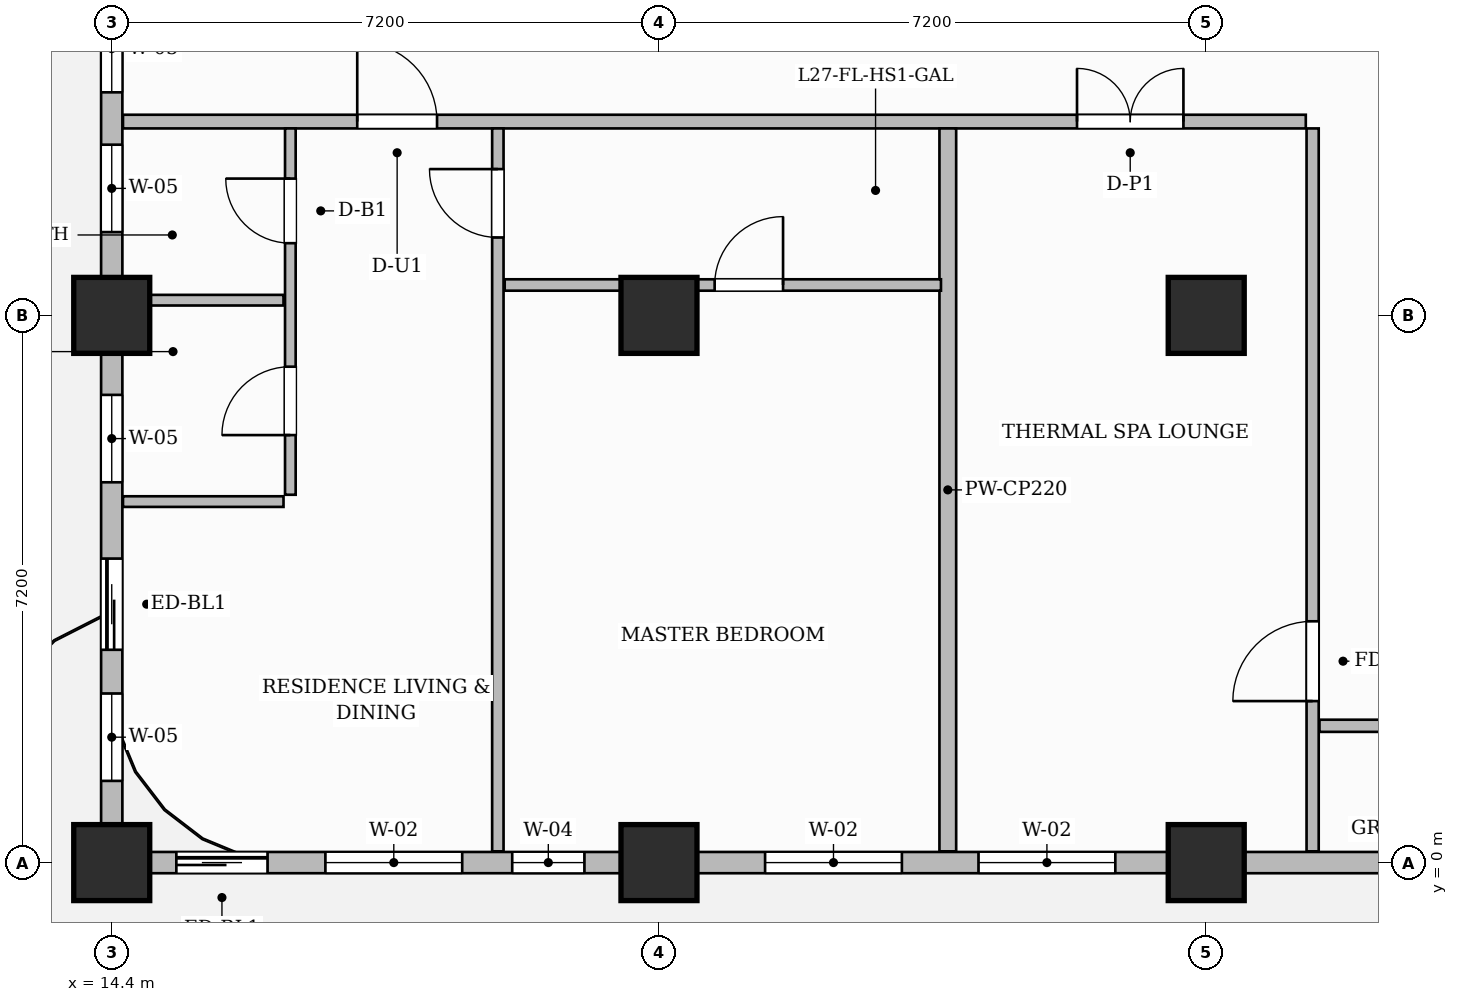
"""IFC4 building model, lengths in metres.
Left out: names, types, materials, properties, quantities, classifications, styles, units other than length and angle.
Written with IfcOpenShell. Run it as: python <this file> out.ifc"""

import sys

from ifc_helpers import new_model, si_unit, direction, frame, frame_2d, origin, origin_2d, place, context, subcontext, project, spatial, rectangle, extrude, source, transform, mapped, element, fill, save


model = new_model("IFC4")
c1 = context("Model", 3, precision=1e-05, world=origin(), true_north=direction((0.0, 1.0)))
c2 = subcontext(c1, "Body", "Model", "MODEL_VIEW")
j1 = project(units=[si_unit("LENGTHUNIT", "METRE"), si_unit("PLANEANGLEUNIT", "RADIAN")], contexts=[c1])
p1 = place(None, origin())
s1 = spatial("IfcSite", under=j1, at=p1, CompositionType="ELEMENT")
p2 = place(p1, origin())
s2 = spatial("IfcBuilding", under=s1, at=p2, CompositionType="ELEMENT")
p3 = place(p2, frame((0.0, 0.0, 111.8)))
s3 = spatial("IfcBuildingStorey", under=s2, at=p3, CompositionType="ELEMENT", Elevation=111.8)
m1 = source(origin(), c2, "Body", "SweptSolid", [
    extrude(rectangle(XDim=1.0, YDim=1.0, at=origin_2d()), origin(), (0.0, 0.0, 1.0), 3.7),
])
for number, where, z_axis, x_axis in (
    (1, (14.4, 0.0, 0.0), (0.0, 0.0, 1.0), (1.0, 0.0, 0.0)),
    (2, (14.4, 7.2, 0.0), (0.0, 0.0, 1.0), (1.0, 0.0, 0.0)),
    (3, (21.6, 0.0, 0.0), (0.0, 0.0, 1.0), (1.0, 0.0, 0.0)),
    (4, (21.6, 7.2, 0.0), (0.0, 0.0, 1.0), (1.0, 0.0, 0.0)),
    (5, (28.8, 0.0, 0.0), (0.0, 0.0, 1.0), (1.0, 0.0, 0.0)),
    (6, (28.8, 7.2, 0.0), (0.0, 0.0, 1.0), (1.0, 0.0, 0.0)),
):
    element("IfcColumn", number, at=place(p3, frame(where, z_axis=z_axis, x_axis=x_axis)), inside=s3, PredefinedType="COLUMN", context=c2, shape_type="MappedRepresentation", body=[
        mapped(m1, transform((0.0, 0.0, 0.0), scale=1.0)),
    ])
p4 = place(p3, frame((14.548, 9.75, 0.0), z_axis=(0.0, 0.0, 1.0), x_axis=(1.0, 0.0, 0.0)))
e7 = element("IfcWall", 7, at=p4, inside=s3, PredefinedType="PARTITIONING", context=c2, shape_type="SweptSolid", body=[
    extrude(rectangle(XDim=15.562, YDim=0.18, at=frame_2d((7.781, 0.0))), origin(), (0.0, 0.0, 1.0), 3.45),
])
p5 = place(p4, frame((3.082, 0.0, 0.0)))
e8 = element("IfcOpeningElement", 8, at=p5, cuts=e7, PredefinedType="OPENING", context=c2, shape_type="SweptSolid", body=[
    extrude(rectangle(XDim=1.05, YDim=2.25, at=frame_2d((0.525, 1.125))), frame((0.0, 0.1, 0.0), z_axis=(0.0, -1.0, 0.0), x_axis=(1.0, 0.0, 0.0)), (0.0, 0.0, 1.0), 0.2),
])
p6 = place(p4, frame((12.552, 0.0, 0.0)))
e9 = element("IfcOpeningElement", 9, at=p6, cuts=e7, PredefinedType="OPENING", context=c2, shape_type="SweptSolid", body=[
    extrude(rectangle(XDim=1.4, YDim=2.35, at=frame_2d((0.7, 1.175))), frame((0.0, 0.1, 0.0), z_axis=(0.0, -1.0, 0.0), x_axis=(1.0, 0.0, 0.0)), (0.0, 0.0, 1.0), 0.2),
])
p7 = place(p3, frame((30.2, 0.148, 0.0), z_axis=(0.0, 0.0, 1.0), x_axis=(0.0, 1.0, 0.0)))
e10 = element("IfcWall", 10, at=p7, inside=s3, PredefinedType="PARTITIONING", context=c2, shape_type="SweptSolid", body=[
    extrude(rectangle(XDim=9.512, YDim=0.16, at=frame_2d((4.756, 0.0))), origin(), (0.0, 0.0, 1.0), 3.45),
])
p8 = place(p7, frame((1.977, 0.0, 0.0)))
e11 = element("IfcOpeningElement", 11, at=p8, cuts=e10, PredefinedType="OPENING", context=c2, shape_type="SweptSolid", body=[
    extrude(rectangle(XDim=1.05, YDim=2.15, at=frame_2d((0.525, 1.075))), frame((0.0, 0.09, 0.0), z_axis=(0.0, -1.0, 0.0), x_axis=(1.0, 0.0, 0.0)), (0.0, 0.0, 1.0), 0.18),
])
p9 = place(p3, frame((30.29, 1.8, 0.0), z_axis=(0.0, 0.0, 1.0), x_axis=(1.0, 0.0, 0.0)))
e12 = element("IfcWall", 12, at=p9, inside=s3, PredefinedType="PARTITIONING", context=c2, shape_type="SweptSolid", body=[
    extrude(rectangle(XDim=19.37, YDim=0.16, at=frame_2d((9.685, 0.0))), origin(), (0.0, 0.0, 1.0), 3.45),
])
p10 = place(p9, frame((2.916, 0.0, 0.0)))
e13 = element("IfcOpeningElement", 13, at=p10, cuts=e12, PredefinedType="OPENING", context=c2, shape_type="SweptSolid", body=[
    extrude(rectangle(XDim=0.9, YDim=2.15, at=frame_2d((0.45, 1.075))), frame((0.0, 0.09, 0.0), z_axis=(0.0, -1.0, 0.0), x_axis=(1.0, 0.0, 0.0)), (0.0, 0.0, 1.0), 0.18),
])
p11 = place(p9, frame((9.66, 0.0, 0.0)))
e14 = element("IfcOpeningElement", 14, at=p11, cuts=e12, PredefinedType="OPENING", context=c2, shape_type="SweptSolid", body=[
    extrude(rectangle(XDim=0.9, YDim=2.15, at=frame_2d((0.45, 1.075))), frame((0.0, 0.09, 0.0), z_axis=(0.0, -1.0, 0.0), x_axis=(1.0, 0.0, 0.0)), (0.0, 0.0, 1.0), 0.18),
])
p12 = place(p9, frame((15.86, 0.0, 0.0)))
e15 = element("IfcOpeningElement", 15, at=p12, cuts=e12, PredefinedType="OPENING", context=c2, shape_type="SweptSolid", body=[
    extrude(rectangle(XDim=0.9, YDim=2.15, at=frame_2d((0.45, 1.075))), frame((0.0, 0.09, 0.0), z_axis=(0.0, -1.0, 0.0), x_axis=(1.0, 0.0, 0.0)), (0.0, 0.0, 1.0), 0.18),
])
p13 = place(p3, frame((25.4, 0.148, 0.0), z_axis=(0.0, 0.0, 1.0), x_axis=(0.0, 1.0, 0.0)))
e16 = element("IfcWall", 16, at=p13, inside=s3, PredefinedType="PARTITIONING", context=c2, shape_type="SweptSolid", body=[
    extrude(rectangle(XDim=9.512, YDim=0.22, at=frame_2d((4.756, 0.0))), origin(), (0.0, 0.0, 1.0), 3.105),
])
p14 = place(p3, frame((16.75, 4.84, 0.0), z_axis=(0.0, 0.0, 1.0), x_axis=(0.0, 1.0, 0.0)))
e17 = element("IfcWall", 17, at=p14, inside=s3, PredefinedType="PARTITIONING", context=c2, shape_type="SweptSolid", body=[
    extrude(rectangle(XDim=4.82, YDim=0.14, at=frame_2d((2.41, 0.0))), origin(), (0.0, 0.0, 1.0), 3.45),
])
p15 = place(p14, frame((0.785, 0.0, 0.0)))
e18 = element("IfcOpeningElement", 18, at=p15, cuts=e17, PredefinedType="OPENING", context=c2, shape_type="SweptSolid", body=[
    extrude(rectangle(XDim=0.9, YDim=2.15, at=frame_2d((0.45, 1.075))), frame((0.0, 0.08, 0.0), z_axis=(0.0, -1.0, 0.0), x_axis=(1.0, 0.0, 0.0)), (0.0, 0.0, 1.0), 0.16),
])
p16 = place(p14, frame((3.31, 0.0, 0.0)))
e19 = element("IfcOpeningElement", 19, at=p16, cuts=e17, PredefinedType="OPENING", context=c2, shape_type="SweptSolid", body=[
    extrude(rectangle(XDim=0.85, YDim=2.1, at=frame_2d((0.425, 1.05))), frame((0.0, 0.08, 0.0), z_axis=(0.0, -1.0, 0.0), x_axis=(1.0, 0.0, 0.0)), (0.0, 0.0, 1.0), 0.16),
])
p17 = place(p3, frame((14.59, 7.4, 0.0), z_axis=(0.0, 0.0, 1.0), x_axis=(1.0, 0.0, 0.0)))
e20 = element("IfcWall", 20, at=p17, inside=s3, PredefinedType="PARTITIONING", context=c2, shape_type="SweptSolid", body=[
    extrude(rectangle(XDim=2.07, YDim=0.14, at=frame_2d((1.035, 0.0))), origin(), (0.0, 0.0, 1.0), 2.935),
])
p18 = place(p3, frame((14.548, 4.75, 0.0), z_axis=(0.0, 0.0, 1.0), x_axis=(1.0, 0.0, 0.0)))
e21 = element("IfcWall", 21, at=p18, inside=s3, PredefinedType="PARTITIONING", context=c2, shape_type="SweptSolid", body=[
    extrude(rectangle(XDim=2.112, YDim=0.14, at=frame_2d((1.056, 0.0))), origin(), (0.0, 0.0, 1.0), 3.45),
])
p19 = place(p3, frame((19.48, 0.148, 0.0), z_axis=(0.0, 0.0, 1.0), x_axis=(0.0, 1.0, 0.0)))
e22 = element("IfcWall", 22, at=p19, inside=s3, PredefinedType="PARTITIONING", context=c2, shape_type="SweptSolid", body=[
    extrude(rectangle(XDim=9.512, YDim=0.15, at=frame_2d((4.756, 0.0))), origin(), (0.0, 0.0, 1.0), 3.45),
])
p20 = place(p19, frame((8.077, 0.0, 0.0)))
e23 = element("IfcOpeningElement", 23, at=p20, cuts=e22, PredefinedType="OPENING", context=c2, shape_type="SweptSolid", body=[
    extrude(rectangle(XDim=0.9, YDim=2.15, at=frame_2d((0.45, 1.075))), frame((0.0, 0.085, 0.0), z_axis=(0.0, -1.0, 0.0), x_axis=(1.0, 0.0, 0.0)), (0.0, 0.0, 1.0), 0.17),
])
p21 = place(p3, frame((19.57, 7.6, 0.0), z_axis=(0.0, 0.0, 1.0), x_axis=(1.0, 0.0, 0.0)))
e24 = element("IfcWall", 24, at=p21, inside=s3, PredefinedType="PARTITIONING", context=c2, shape_type="SweptSolid", body=[
    extrude(rectangle(XDim=5.74, YDim=0.15, at=frame_2d((2.87, 0.0))), origin(), (0.0, 0.0, 1.0), 3.45),
])
p22 = place(p21, frame((2.762, 0.0, 0.0)))
e25 = element("IfcOpeningElement", 25, at=p22, cuts=e24, PredefinedType="OPENING", context=c2, shape_type="SweptSolid", body=[
    extrude(rectangle(XDim=0.9, YDim=2.15, at=frame_2d((0.45, 1.075))), frame((0.0, 0.085, 0.0), z_axis=(0.0, -1.0, 0.0), x_axis=(1.0, 0.0, 0.0)), (0.0, 0.0, 1.0), 0.17),
])
p23 = place(p3, frame((14.4, 0.0, 0.0), z_axis=(0.0, 0.0, 1.0), x_axis=(1.0, 0.0, 0.0)))
e26 = element("IfcWall", 26, at=p23, inside=s3, PredefinedType="SOLIDWALL", context=c2, shape_type="SweptSolid", body=[
    extrude(rectangle(XDim=35.4, YDim=0.28, at=frame_2d((17.7, 0.0))), origin(), (0.0, 0.0, 1.0), 2.935),
])
p24 = place(p23, frame((0.85, 0.0, 0.0)))
e27 = element("IfcOpeningElement", 27, at=p24, cuts=e26, PredefinedType="OPENING", context=c2, shape_type="SweptSolid", body=[
    extrude(rectangle(XDim=1.2, YDim=2.2, at=frame_2d((0.6, 1.1))), frame((0.0, 0.15, 0.0), z_axis=(0.0, -1.0, 0.0), x_axis=(1.0, 0.0, 0.0)), (0.0, 0.0, 1.0), 0.3),
])
p25 = place(p23, frame((2.811, 0.0, 0.8)))
e28 = element("IfcOpeningElement", 28, at=p25, cuts=e26, PredefinedType="OPENING", context=c2, shape_type="SweptSolid", body=[
    extrude(rectangle(XDim=1.8, YDim=1.85, at=frame_2d((0.9, 0.925))), frame((0.0, 0.15, 0.0), z_axis=(0.0, -1.0, 0.0), x_axis=(1.0, 0.0, 0.0)), (0.0, 0.0, 1.0), 0.3),
])
p26 = place(p23, frame((5.269, 0.0, 0.8)))
e29 = element("IfcOpeningElement", 29, at=p26, cuts=e26, PredefinedType="OPENING", context=c2, shape_type="SweptSolid", body=[
    extrude(rectangle(XDim=0.95, YDim=1.75, at=frame_2d((0.475, 0.875))), frame((0.0, 0.15, 0.0), z_axis=(0.0, -1.0, 0.0), x_axis=(1.0, 0.0, 0.0)), (0.0, 0.0, 1.0), 0.3),
])
p27 = place(p23, frame((8.596, 0.0, 0.8)))
e30 = element("IfcOpeningElement", 30, at=p27, cuts=e26, PredefinedType="OPENING", context=c2, shape_type="SweptSolid", body=[
    extrude(rectangle(XDim=1.8, YDim=1.85, at=frame_2d((0.9, 0.925))), frame((0.0, 0.15, 0.0), z_axis=(0.0, -1.0, 0.0), x_axis=(1.0, 0.0, 0.0)), (0.0, 0.0, 1.0), 0.3),
])
p28 = place(p23, frame((11.404, 0.0, 0.8)))
e31 = element("IfcOpeningElement", 31, at=p28, cuts=e26, PredefinedType="OPENING", context=c2, shape_type="SweptSolid", body=[
    extrude(rectangle(XDim=1.8, YDim=1.85, at=frame_2d((0.9, 0.925))), frame((0.0, 0.15, 0.0), z_axis=(0.0, -1.0, 0.0), x_axis=(1.0, 0.0, 0.0)), (0.0, 0.0, 1.0), 0.3),
])
p29 = place(p23, frame((16.804, 0.0, 0.8)))
e32 = element("IfcOpeningElement", 32, at=p29, cuts=e26, PredefinedType="OPENING", context=c2, shape_type="SweptSolid", body=[
    extrude(rectangle(XDim=1.8, YDim=1.85, at=frame_2d((0.9, 0.925))), frame((0.0, 0.15, 0.0), z_axis=(0.0, -1.0, 0.0), x_axis=(1.0, 0.0, 0.0)), (0.0, 0.0, 1.0), 0.3),
])
p30 = place(p23, frame((21.521, 0.0, 0.8)))
e33 = element("IfcOpeningElement", 33, at=p30, cuts=e26, PredefinedType="OPENING", context=c2, shape_type="SweptSolid", body=[
    extrude(rectangle(XDim=0.95, YDim=1.75, at=frame_2d((0.475, 0.875))), frame((0.0, 0.15, 0.0), z_axis=(0.0, -1.0, 0.0), x_axis=(1.0, 0.0, 0.0)), (0.0, 0.0, 1.0), 0.3),
])
p31 = place(p23, frame((23.904, 0.0, 0.8)))
e34 = element("IfcOpeningElement", 34, at=p31, cuts=e26, PredefinedType="OPENING", context=c2, shape_type="SweptSolid", body=[
    extrude(rectangle(XDim=1.8, YDim=1.85, at=frame_2d((0.9, 0.925))), frame((0.0, 0.15, 0.0), z_axis=(0.0, -1.0, 0.0), x_axis=(1.0, 0.0, 0.0)), (0.0, 0.0, 1.0), 0.3),
])
p32 = place(p23, frame((29.681, 0.0, 0.8)))
e35 = element("IfcOpeningElement", 35, at=p32, cuts=e26, PredefinedType="OPENING", context=c2, shape_type="SweptSolid", body=[
    extrude(rectangle(XDim=1.8, YDim=1.85, at=frame_2d((0.9, 0.925))), frame((0.0, 0.15, 0.0), z_axis=(0.0, -1.0, 0.0), x_axis=(1.0, 0.0, 0.0)), (0.0, 0.0, 1.0), 0.3),
])
p33 = place(p23, frame((32.327, 0.0, 0.8)))
e36 = element("IfcOpeningElement", 36, at=p33, cuts=e26, PredefinedType="OPENING", context=c2, shape_type="SweptSolid", body=[
    extrude(rectangle(XDim=1.8, YDim=1.85, at=frame_2d((0.9, 0.925))), frame((0.0, 0.15, 0.0), z_axis=(0.0, -1.0, 0.0), x_axis=(1.0, 0.0, 0.0)), (0.0, 0.0, 1.0), 0.3),
])
p34 = place(p3, frame((14.4, 0.05, 0.0), z_axis=(0.0, 0.0, 1.0), x_axis=(0.0, 1.0, 0.0)))
e37 = element("IfcWall", 37, at=p34, inside=s3, PredefinedType="SOLIDWALL", context=c2, shape_type="SweptSolid", body=[
    extrude(rectangle(XDim=20.6, YDim=0.28, at=frame_2d((10.3, 0.0))), origin(), (0.0, 0.0, 1.0), 2.935),
])
p35 = place(p34, frame((2.75, 0.0, 0.0)))
e38 = element("IfcOpeningElement", 38, at=p35, cuts=e37, PredefinedType="OPENING", context=c2, shape_type="SweptSolid", body=[
    extrude(rectangle(XDim=1.2, YDim=2.2, at=frame_2d((0.6, 1.1))), frame((0.0, 0.15, 0.0), z_axis=(0.0, -1.0, 0.0), x_axis=(1.0, 0.0, 0.0)), (0.0, 0.0, 1.0), 0.3),
])
p36 = place(p34, frame((1.025, 0.0, 0.8)))
e39 = element("IfcOpeningElement", 39, at=p36, cuts=e37, PredefinedType="OPENING", context=c2, shape_type="SweptSolid", body=[
    extrude(rectangle(XDim=1.15, YDim=1.8, at=frame_2d((0.575, 0.9))), frame((0.0, 0.15, 0.0), z_axis=(0.0, -1.0, 0.0), x_axis=(1.0, 0.0, 0.0)), (0.0, 0.0, 1.0), 0.3),
])
p37 = place(p34, frame((4.954, 0.0, 0.8)))
e40 = element("IfcOpeningElement", 40, at=p37, cuts=e37, PredefinedType="OPENING", context=c2, shape_type="SweptSolid", body=[
    extrude(rectangle(XDim=1.15, YDim=1.8, at=frame_2d((0.575, 0.9))), frame((0.0, 0.15, 0.0), z_axis=(0.0, -1.0, 0.0), x_axis=(1.0, 0.0, 0.0)), (0.0, 0.0, 1.0), 0.3),
])
p38 = place(p34, frame((8.246, 0.0, 0.8)))
e41 = element("IfcOpeningElement", 41, at=p38, cuts=e37, PredefinedType="OPENING", context=c2, shape_type="SweptSolid", body=[
    extrude(rectangle(XDim=1.15, YDim=1.8, at=frame_2d((0.575, 0.9))), frame((0.0, 0.15, 0.0), z_axis=(0.0, -1.0, 0.0), x_axis=(1.0, 0.0, 0.0)), (0.0, 0.0, 1.0), 0.3),
])
p39 = place(p34, frame((10.085, 0.0, 0.8)))
e42 = element("IfcOpeningElement", 42, at=p39, cuts=e37, PredefinedType="OPENING", context=c2, shape_type="SweptSolid", body=[
    extrude(rectangle(XDim=1.15, YDim=1.8, at=frame_2d((0.575, 0.9))), frame((0.0, 0.15, 0.0), z_axis=(0.0, -1.0, 0.0), x_axis=(1.0, 0.0, 0.0)), (0.0, 0.0, 1.0), 0.3),
])
p40 = place(p34, frame((12.014, 0.0, 0.8)))
e43 = element("IfcOpeningElement", 43, at=p40, cuts=e37, PredefinedType="OPENING", context=c2, shape_type="SweptSolid", body=[
    extrude(rectangle(XDim=1.15, YDim=1.8, at=frame_2d((0.575, 0.9))), frame((0.0, 0.15, 0.0), z_axis=(0.0, -1.0, 0.0), x_axis=(1.0, 0.0, 0.0)), (0.0, 0.0, 1.0), 0.3),
])
p41 = place(p34, frame((16.79, 0.0, 0.8)))
e44 = element("IfcOpeningElement", 44, at=p41, cuts=e37, PredefinedType="OPENING", context=c2, shape_type="SweptSolid", body=[
    extrude(rectangle(XDim=1.8, YDim=1.85, at=frame_2d((0.9, 0.925))), frame((0.0, 0.15, 0.0), z_axis=(0.0, -1.0, 0.0), x_axis=(1.0, 0.0, 0.0)), (0.0, 0.0, 1.0), 0.3),
])
m2 = source(origin(), c2, "Body", "SweptSolid", [
    extrude(rectangle(XDim=1.05, YDim=2.15, at=frame_2d((0.525, 1.075))), frame((0.0, 0.025, 0.0), z_axis=(0.0, -1.0, 0.0), x_axis=(1.0, 0.0, 0.0)), (0.0, 0.0, 1.0), 0.05),
])
p42 = place(p8, origin())
e45 = element("IfcDoor", 45, at=p42, inside=s3, OperationType="SINGLE_SWING_LEFT", PredefinedType="DOOR", context=c2, shape_type="MappedRepresentation", body=[
    mapped(m2, transform((0.0, 0.0, 0.0), scale=1.0)),
])
fill(e11, e45)
m3 = source(origin(), c2, "Body", "SweptSolid", [
    extrude(rectangle(XDim=0.9, YDim=2.15, at=frame_2d((0.45, 1.075))), frame((0.0, 0.025, 0.0), z_axis=(0.0, -1.0, 0.0), x_axis=(1.0, 0.0, 0.0)), (0.0, 0.0, 1.0), 0.05),
])
p43 = place(p15, origin())
e46 = element("IfcDoor", 46, at=p43, inside=s3, OperationType="SINGLE_SWING_LEFT", PredefinedType="DOOR", context=c2, shape_type="MappedRepresentation", body=[
    mapped(m3, transform((0.0, 0.0, 0.0), scale=1.0)),
])
fill(e18, e46)
m4 = source(origin(), c2, "Body", "SweptSolid", [
    extrude(rectangle(XDim=0.85, YDim=2.1, at=frame_2d((0.425, 1.05))), frame((0.0, 0.025, 0.0), z_axis=(0.0, -1.0, 0.0), x_axis=(1.0, 0.0, 0.0)), (0.0, 0.0, 1.0), 0.05),
])
p44 = place(p16, origin())
e47 = element("IfcDoor", 47, at=p44, inside=s3, OperationType="SINGLE_SWING_RIGHT", PredefinedType="DOOR", context=c2, shape_type="MappedRepresentation", body=[
    mapped(m4, transform((0.0, 0.0, 0.0), scale=1.0)),
])
fill(e19, e47)
m5 = source(origin(), c2, "Body", "SweptSolid", [
    extrude(rectangle(XDim=1.05, YDim=2.25, at=frame_2d((0.525, 1.125))), frame((0.0, 0.025, 0.0), z_axis=(0.0, -1.0, 0.0), x_axis=(1.0, 0.0, 0.0)), (0.0, 0.0, 1.0), 0.05),
])
p45 = place(p5, origin())
e48 = element("IfcDoor", 48, at=p45, inside=s3, OperationType="SINGLE_SWING_LEFT", PredefinedType="DOOR", context=c2, shape_type="MappedRepresentation", body=[
    mapped(m5, transform((0.0, 0.0, 0.0), scale=1.0)),
])
fill(e8, e48)
p46 = place(p20, origin())
e49 = element("IfcDoor", 49, at=p46, inside=s3, OperationType="SINGLE_SWING_RIGHT", PredefinedType="DOOR", context=c2, shape_type="MappedRepresentation", body=[
    mapped(m3, transform((0.0, 0.0, 0.0), scale=1.0)),
])
fill(e23, e49)
p47 = place(p22, origin())
e50 = element("IfcDoor", 50, at=p47, inside=s3, OperationType="SINGLE_SWING_RIGHT", PredefinedType="DOOR", context=c2, shape_type="MappedRepresentation", body=[
    mapped(m3, transform((0.0, 0.0, 0.0), scale=1.0)),
])
fill(e25, e50)
m6 = source(origin(), c2, "Body", "SweptSolid", [
    extrude(rectangle(XDim=1.4, YDim=2.35, at=frame_2d((0.7, 1.175))), frame((0.0, 0.025, 0.0), z_axis=(0.0, -1.0, 0.0), x_axis=(1.0, 0.0, 0.0)), (0.0, 0.0, 1.0), 0.05),
])
p48 = place(p6, origin())
e51 = element("IfcDoor", 51, at=p48, inside=s3, OperationType="DOUBLE_DOOR_SINGLE_SWING", PredefinedType="DOOR", context=c2, shape_type="MappedRepresentation", body=[
    mapped(m6, transform((0.0, 0.0, 0.0), scale=1.0)),
])
fill(e9, e51)
m7 = source(origin(), c2, "Body", "SweptSolid", [
    extrude(rectangle(XDim=1.2, YDim=2.2, at=frame_2d((0.6, 1.1))), frame((0.0, 0.025, 0.0), z_axis=(0.0, -1.0, 0.0), x_axis=(1.0, 0.0, 0.0)), (0.0, 0.0, 1.0), 0.05),
])
p49 = place(p24, origin())
e52 = element("IfcDoor", 52, at=p49, inside=s3, OperationType="SLIDING_TO_LEFT", PredefinedType="DOOR", context=c2, shape_type="MappedRepresentation", body=[
    mapped(m7, transform((0.0, 0.0, 0.0), scale=1.0)),
])
fill(e27, e52)
p50 = place(p35, origin())
e53 = element("IfcDoor", 53, at=p50, inside=s3, OperationType="SLIDING_TO_LEFT", PredefinedType="DOOR", context=c2, shape_type="MappedRepresentation", body=[
    mapped(m7, transform((0.0, 0.0, 0.0), scale=1.0)),
])
fill(e38, e53)
m8 = source(origin(), c2, "Body", "SweptSolid", [
    extrude(rectangle(XDim=1.8, YDim=1.85, at=frame_2d((0.9, 0.925))), frame((0.0, 0.03, 0.0), z_axis=(0.0, -1.0, 0.0), x_axis=(1.0, 0.0, 0.0)), (0.0, 0.0, 1.0), 0.06),
])
p51 = place(p25, origin())
e54 = element("IfcWindow", 54, at=p51, inside=s3, PartitioningType="DOUBLE_PANEL_VERTICAL", PredefinedType="WINDOW", context=c2, shape_type="MappedRepresentation", body=[
    mapped(m8, transform((0.0, 0.0, 0.0), scale=1.0)),
])
fill(e28, e54)
m9 = source(origin(), c2, "Body", "SweptSolid", [
    extrude(rectangle(XDim=0.95, YDim=1.75, at=frame_2d((0.475, 0.875))), frame((0.0, 0.03, 0.0), z_axis=(0.0, -1.0, 0.0), x_axis=(1.0, 0.0, 0.0)), (0.0, 0.0, 1.0), 0.06),
])
p52 = place(p26, origin())
e55 = element("IfcWindow", 55, at=p52, inside=s3, PartitioningType="SINGLE_PANEL", PredefinedType="WINDOW", context=c2, shape_type="MappedRepresentation", body=[
    mapped(m9, transform((0.0, 0.0, 0.0), scale=1.0)),
])
fill(e29, e55)
p53 = place(p27, origin())
e56 = element("IfcWindow", 56, at=p53, inside=s3, PartitioningType="DOUBLE_PANEL_VERTICAL", PredefinedType="WINDOW", context=c2, shape_type="MappedRepresentation", body=[
    mapped(m8, transform((0.0, 0.0, 0.0), scale=1.0)),
])
fill(e30, e56)
p54 = place(p28, origin())
e57 = element("IfcWindow", 57, at=p54, inside=s3, PartitioningType="DOUBLE_PANEL_VERTICAL", PredefinedType="WINDOW", context=c2, shape_type="MappedRepresentation", body=[
    mapped(m8, transform((0.0, 0.0, 0.0), scale=1.0)),
])
fill(e31, e57)
m10 = source(origin(), c2, "Body", "SweptSolid", [
    extrude(rectangle(XDim=1.15, YDim=1.8, at=frame_2d((0.575, 0.9))), frame((0.0, 0.03, 0.0), z_axis=(0.0, -1.0, 0.0), x_axis=(1.0, 0.0, 0.0)), (0.0, 0.0, 1.0), 0.06),
])
p55 = place(p36, origin())
e58 = element("IfcWindow", 58, at=p55, inside=s3, PartitioningType="SINGLE_PANEL", PredefinedType="WINDOW", context=c2, shape_type="MappedRepresentation", body=[
    mapped(m10, transform((0.0, 0.0, 0.0), scale=1.0)),
])
fill(e39, e58)
p56 = place(p37, origin())
e59 = element("IfcWindow", 59, at=p56, inside=s3, PartitioningType="SINGLE_PANEL", PredefinedType="WINDOW", context=c2, shape_type="MappedRepresentation", body=[
    mapped(m10, transform((0.0, 0.0, 0.0), scale=1.0)),
])
fill(e40, e59)
p57 = place(p38, origin())
e60 = element("IfcWindow", 60, at=p57, inside=s3, PartitioningType="SINGLE_PANEL", PredefinedType="WINDOW", context=c2, shape_type="MappedRepresentation", body=[
    mapped(m10, transform((0.0, 0.0, 0.0), scale=1.0)),
])
fill(e41, e60)
p58 = place(p39, origin())
e61 = element("IfcWindow", 61, at=p58, inside=s3, PartitioningType="SINGLE_PANEL", PredefinedType="WINDOW", context=c2, shape_type="MappedRepresentation", body=[
    mapped(m10, transform((0.0, 0.0, 0.0), scale=1.0)),
])
fill(e42, e61)
save(model, sys.argv[1])
